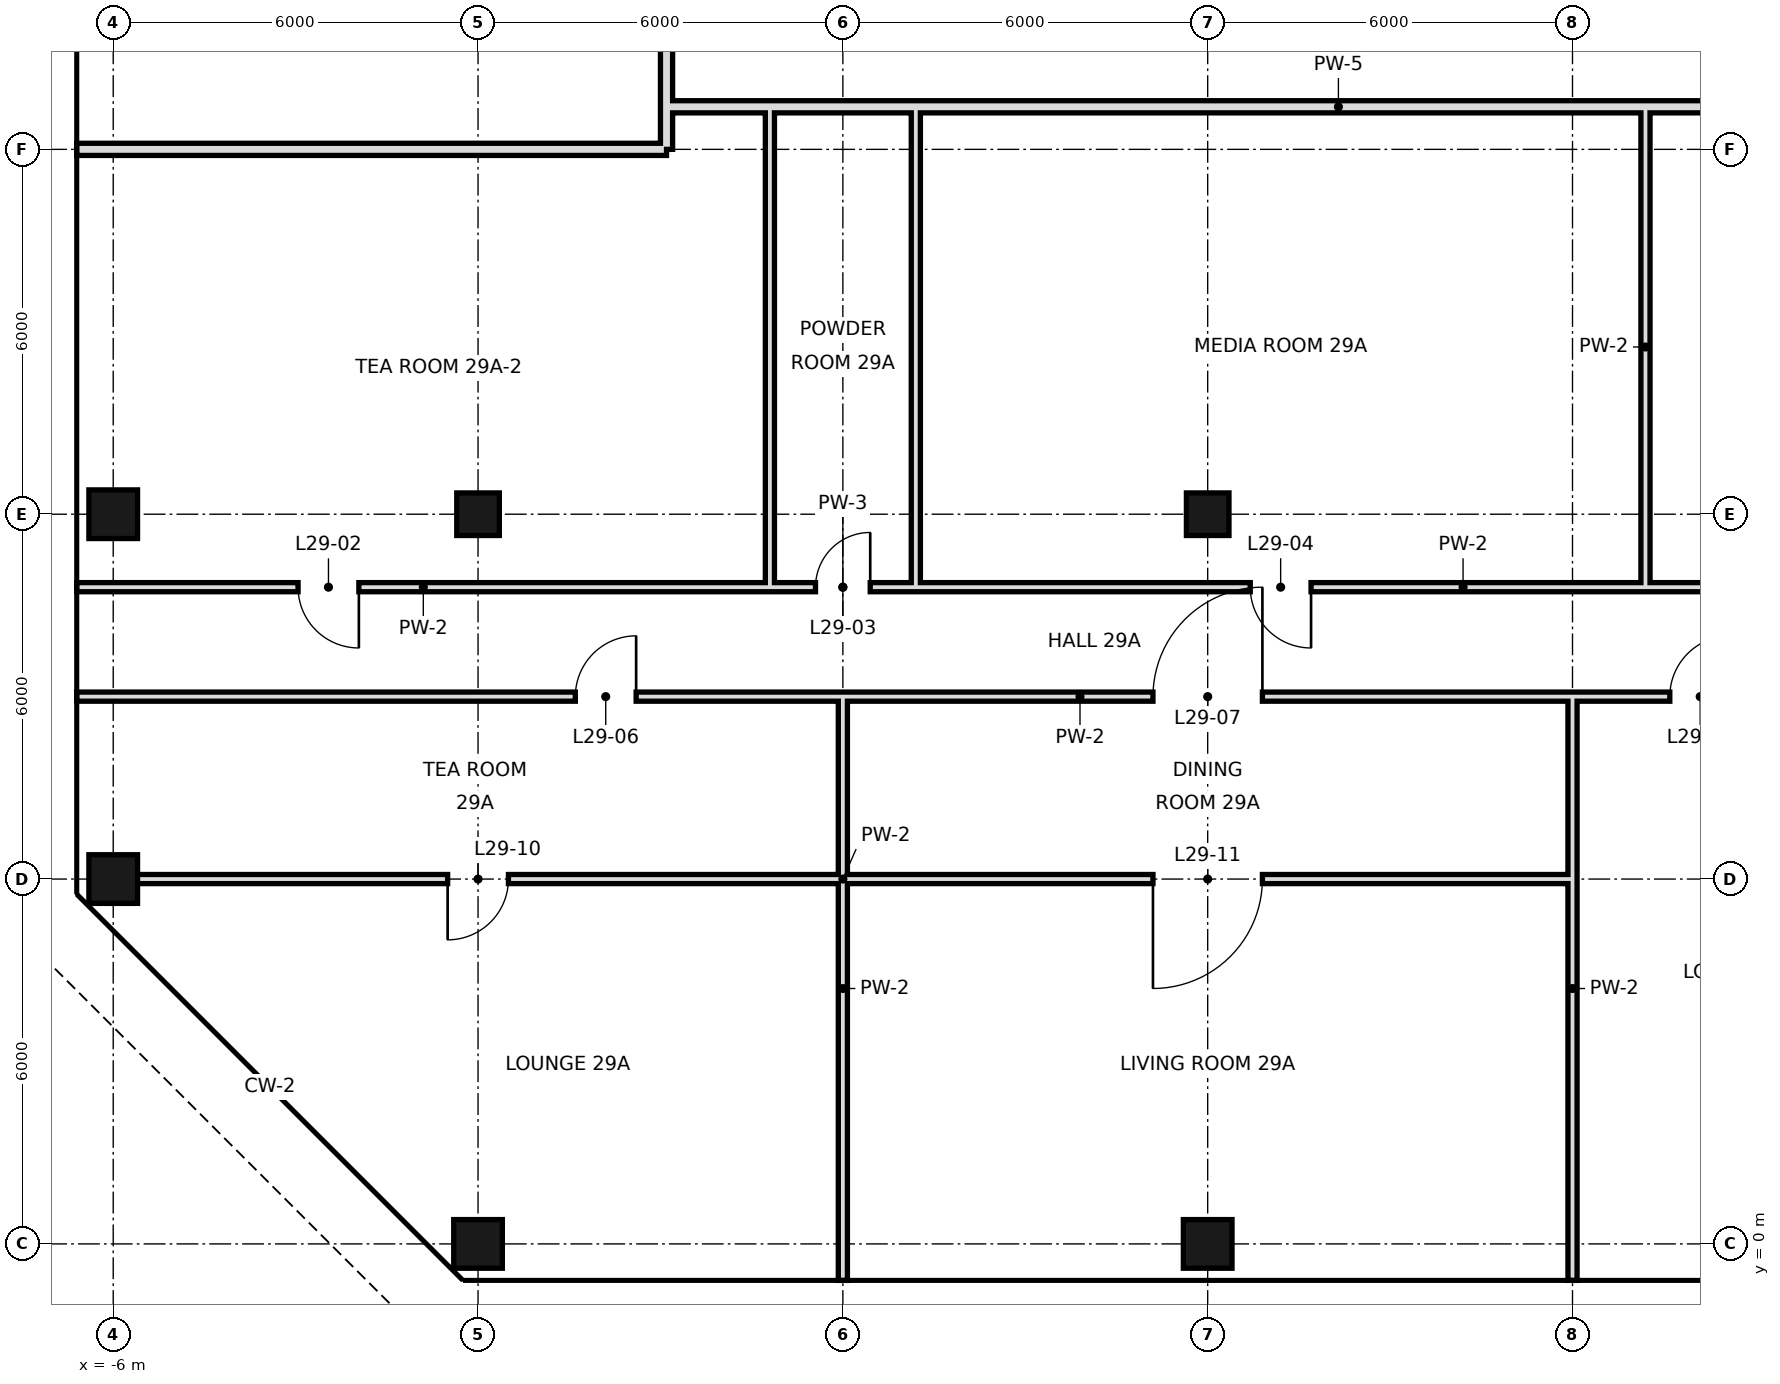
"""IFC4 building model, lengths in metres.
Left out: names, types, materials, properties, quantities, classifications, styles, units other than length and angle.
Written with IfcOpenShell. Run it as: python <this file> out.ifc"""

import sys

from ifc_helpers import new_model, si_unit, direction, frame, frame_2d, origin, origin_2d, place, context, subcontext, project, spatial, rectangle, hollow_rectangle, extrude, element, fill, save


model = new_model("IFC4")
c1 = context("Model", 3, precision=1e-05, world=origin(), true_north=direction((0.0, 1.0)))
c2 = subcontext(c1, "Body", "Model", "MODEL_VIEW")
j1 = project(units=[si_unit("LENGTHUNIT", "METRE"), si_unit("PLANEANGLEUNIT", "RADIAN")], contexts=[c1])
p1 = place(None, origin())
s1 = spatial("IfcSite", under=j1, at=p1, CompositionType="ELEMENT")
p2 = place(p1, origin())
s2 = spatial("IfcBuilding", under=s1, at=p2, CompositionType="ELEMENT")
p3 = place(p2, frame((0.0, 0.0, 130.4)))
s3 = spatial("IfcBuildingStorey", under=s2, at=p3, CompositionType="ELEMENT", Elevation=130.4)
for number, where, z_axis, x_axis in (
    (1, (-6.0, 6.0, 0.0), (0.0, 0.0, 1.0), (1.0, 0.0, 0.0)),
    (2, (-6.0, 12.0, 0.0), (0.0, 0.0, 1.0), (1.0, 0.0, 0.0)),
    (3, (0.0, 0.0, 0.0), (0.0, 0.0, 1.0), (1.0, 0.0, 0.0)),
):
    element("IfcColumn", number, at=place(p3, frame(where, z_axis=z_axis, x_axis=x_axis)), inside=s3, PredefinedType="COLUMN", context=c2, shape_type="SweptSolid", body=[
        extrude(hollow_rectangle(XDim=0.8, YDim=0.8, WallThickness=0.04, at=origin_2d()), origin(), (0.0, 0.0, 1.0), 3.6),
    ])
p4 = place(p3, frame((0.0, 12.0, 0.0), z_axis=(0.0, 0.0, 1.0), x_axis=(1.0, 0.0, 0.0)))
e4 = element("IfcColumn", 4, at=p4, inside=s3, PredefinedType="COLUMN", context=c2, shape_type="SweptSolid", body=[
    extrude(hollow_rectangle(XDim=0.7, YDim=0.7, WallThickness=0.036, at=origin_2d()), origin(), (0.0, 0.0, 1.0), 3.6),
])
p5 = place(p3, frame((12.0, 0.0, 0.0), z_axis=(0.0, 0.0, 1.0), x_axis=(1.0, 0.0, 0.0)))
e5 = element("IfcColumn", 5, at=p5, inside=s3, PredefinedType="COLUMN", context=c2, shape_type="SweptSolid", body=[
    extrude(hollow_rectangle(XDim=0.8, YDim=0.8, WallThickness=0.04, at=origin_2d()), origin(), (0.0, 0.0, 1.0), 3.6),
])
p6 = place(p3, frame((12.0, 12.0, 0.0), z_axis=(0.0, 0.0, 1.0), x_axis=(1.0, 0.0, 0.0)))
e6 = element("IfcColumn", 6, at=p6, inside=s3, PredefinedType="COLUMN", context=c2, shape_type="SweptSolid", body=[
    extrude(hollow_rectangle(XDim=0.7, YDim=0.7, WallThickness=0.036, at=origin_2d()), origin(), (0.0, 0.0, 1.0), 3.6),
])
p7 = place(p3, frame((18.0, -0.6, 0.0), z_axis=(0.0, 0.0, 1.0), x_axis=(0.0, 1.0, 0.0)))
e7 = element("IfcWall", 7, at=p7, inside=s3, PredefinedType="PARTITIONING", context=c2, shape_type="SweptSolid", body=[
    extrude(rectangle(XDim=9.6, YDim=0.15, at=frame_2d((4.8, 0.0))), origin(), (0.0, 0.0, 1.0), 2.72),
])
p8 = place(p3, frame((19.2, 10.8, 0.0), z_axis=(0.0, 0.0, 1.0), x_axis=(0.0, 1.0, 0.0)))
e8 = element("IfcWall", 8, at=p8, inside=s3, PredefinedType="PARTITIONING", context=c2, shape_type="SweptSolid", body=[
    extrude(rectangle(XDim=7.9, YDim=0.15, at=frame_2d((3.95, 0.0))), origin(), (0.0, 0.0, 1.0), 3.42),
])
p9 = place(p3, frame((3.1, 18.0, 0.0), z_axis=(0.0, 0.0, 1.0), x_axis=(0.0, 1.0, 0.0)))
e9 = element("IfcWall", 9, at=p9, inside=s3, PredefinedType="SOLIDWALL", context=c2, shape_type="SweptSolid", body=[
    extrude(rectangle(XDim=30.6, YDim=0.2, at=frame_2d((15.3, 0.0))), origin(), (0.0, 0.0, 1.0), 2.72),
])
p10 = place(p9, frame((9.23, 0.0, 0.0)))
e10 = element("IfcOpeningElement", 10, at=p10, cuts=e9, PredefinedType="OPENING", context=c2, shape_type="SweptSolid", body=[
    extrude(rectangle(XDim=1.2, YDim=2.4, at=frame_2d((0.6, 1.2))), frame((0.0, 0.11, 0.0), z_axis=(0.0, -1.0, 0.0), x_axis=(1.0, 0.0, 0.0)), (0.0, 0.0, 1.0), 0.22),
])
p11 = place(p3, frame((4.8, 10.8, 0.0), z_axis=(0.0, 0.0, 1.0), x_axis=(0.0, 1.0, 0.0)))
e11 = element("IfcWall", 11, at=p11, inside=s3, PredefinedType="PARTITIONING", context=c2, shape_type="SweptSolid", body=[
    extrude(rectangle(XDim=7.9, YDim=0.15, at=frame_2d((3.95, 0.0))), origin(), (0.0, 0.0, 1.0), 3.42),
])
p12 = place(p3, frame((6.0, -0.6, 0.0), z_axis=(0.0, 0.0, 1.0), x_axis=(0.0, 1.0, 0.0)))
e12 = element("IfcWall", 12, at=p12, inside=s3, PredefinedType="PARTITIONING", context=c2, shape_type="SweptSolid", body=[
    extrude(rectangle(XDim=9.6, YDim=0.15, at=frame_2d((4.8, 0.0))), origin(), (0.0, 0.0, 1.0), 2.72),
])
p13 = place(p3, frame((7.2, 10.8, 0.0), z_axis=(0.0, 0.0, 1.0), x_axis=(0.0, 1.0, 0.0)))
e13 = element("IfcWall", 13, at=p13, inside=s3, PredefinedType="PARTITIONING", context=c2, shape_type="SweptSolid", body=[
    extrude(rectangle(XDim=7.9, YDim=0.15, at=frame_2d((3.95, 0.0))), origin(), (0.0, 0.0, 1.0), 3.42),
])
p14 = place(p3, frame((-6.6, 10.8, 0.0), z_axis=(0.0, 0.0, 1.0), x_axis=(1.0, 0.0, 0.0)))
e14 = element("IfcWall", 14, at=p14, inside=s3, PredefinedType="PARTITIONING", context=c2, shape_type="SweptSolid", body=[
    extrude(rectangle(XDim=11.4, YDim=0.15, at=frame_2d((5.7, 0.0))), origin(), (0.0, 0.0, 1.0), 3.42),
])
p15 = place(p14, frame((3.64, 0.0, 0.0)))
e15 = element("IfcOpeningElement", 15, at=p15, cuts=e14, PredefinedType="OPENING", context=c2, shape_type="SweptSolid", body=[
    extrude(rectangle(XDim=1.0, YDim=2.4, at=frame_2d((0.5, 1.2))), frame((0.0, 0.085, 0.0), z_axis=(0.0, -1.0, 0.0), x_axis=(1.0, 0.0, 0.0)), (0.0, 0.0, 1.0), 0.17),
])
p16 = place(p3, frame((7.2, 10.8, 0.0), z_axis=(0.0, 0.0, 1.0), x_axis=(1.0, 0.0, 0.0)))
e16 = element("IfcWall", 16, at=p16, inside=s3, PredefinedType="PARTITIONING", context=c2, shape_type="SweptSolid", body=[
    extrude(rectangle(XDim=18.0, YDim=0.15, at=frame_2d((9.0, 0.0))), origin(), (0.0, 0.0, 1.0), 3.42),
])
p17 = place(p16, frame((14.5, 0.0, 0.0)))
e17 = element("IfcOpeningElement", 17, at=p17, cuts=e16, PredefinedType="OPENING", context=c2, shape_type="SweptSolid", body=[
    extrude(rectangle(XDim=1.0, YDim=2.4, at=frame_2d((0.5, 1.2))), frame((0.0, 0.085, 0.0), z_axis=(0.0, -1.0, 0.0), x_axis=(1.0, 0.0, 0.0)), (0.0, 0.0, 1.0), 0.17),
])
p18 = place(p16, frame((5.5, 0.0, 0.0)))
e18 = element("IfcOpeningElement", 18, at=p18, cuts=e16, PredefinedType="OPENING", context=c2, shape_type="SweptSolid", body=[
    extrude(rectangle(XDim=1.0, YDim=2.4, at=frame_2d((0.5, 1.2))), frame((0.0, 0.085, 0.0), z_axis=(0.0, -1.0, 0.0), x_axis=(1.0, 0.0, 0.0)), (0.0, 0.0, 1.0), 0.17),
])
p19 = place(p3, frame((4.8, 10.8, 0.0), z_axis=(0.0, 0.0, 1.0), x_axis=(1.0, 0.0, 0.0)))
e19 = element("IfcWall", 19, at=p19, inside=s3, PredefinedType="PARTITIONING", context=c2, shape_type="SweptSolid", body=[
    extrude(rectangle(XDim=2.4, YDim=0.15, at=frame_2d((1.2, 0.0))), origin(), (0.0, 0.0, 1.0), 3.42),
])
p20 = place(p19, frame((0.75, 0.0, 0.0)))
e20 = element("IfcOpeningElement", 20, at=p20, cuts=e19, PredefinedType="OPENING", context=c2, shape_type="SweptSolid", body=[
    extrude(rectangle(XDim=0.9, YDim=2.4, at=frame_2d((0.45, 1.2))), frame((0.0, 0.085, 0.0), z_axis=(0.0, -1.0, 0.0), x_axis=(1.0, 0.0, 0.0)), (0.0, 0.0, 1.0), 0.17),
])
p21 = place(p3, frame((-6.6, 18.0, 0.0), z_axis=(0.0, 0.0, 1.0), x_axis=(1.0, 0.0, 0.0)))
e21 = element("IfcWall", 21, at=p21, inside=s3, PredefinedType="SOLIDWALL", context=c2, shape_type="SweptSolid", body=[
    extrude(rectangle(XDim=9.7, YDim=0.2, at=frame_2d((4.85, 0.0))), origin(), (0.0, 0.0, 1.0), 2.72),
])
p22 = place(p3, frame((3.1, 18.7, 0.0), z_axis=(0.0, 0.0, 1.0), x_axis=(1.0, 0.0, 0.0)))
e22 = element("IfcWall", 22, at=p22, inside=s3, PredefinedType="SOLIDWALL", context=c2, shape_type="SweptSolid", body=[
    extrude(rectangle(XDim=22.1, YDim=0.2, at=frame_2d((11.05, 0.0))), origin(), (0.0, 0.0, 1.0), 2.72),
])
p23 = place(p22, frame((19.36, 0.0, 0.0)))
e23 = element("IfcOpeningElement", 23, at=p23, cuts=e22, PredefinedType="OPENING", context=c2, shape_type="SweptSolid", body=[
    extrude(rectangle(XDim=1.2, YDim=2.4, at=frame_2d((0.6, 1.2))), frame((0.0, 0.11, 0.0), z_axis=(0.0, -1.0, 0.0), x_axis=(1.0, 0.0, 0.0)), (0.0, 0.0, 1.0), 0.22),
])
p24 = place(p3, frame((-6.0, 6.0, 0.0), z_axis=(0.0, 0.0, 1.0), x_axis=(1.0, 0.0, 0.0)))
e24 = element("IfcWall", 24, at=p24, inside=s3, PredefinedType="PARTITIONING", context=c2, shape_type="SweptSolid", body=[
    extrude(rectangle(XDim=24.0, YDim=0.15, at=frame_2d((12.0, 0.0))), origin(), (0.0, 0.0, 1.0), 2.97),
])
p25 = place(p24, frame((5.5, 0.0, 0.0)))
e25 = element("IfcOpeningElement", 25, at=p25, cuts=e24, PredefinedType="OPENING", context=c2, shape_type="SweptSolid", body=[
    extrude(rectangle(XDim=1.0, YDim=2.4, at=frame_2d((0.5, 1.2))), frame((0.0, 0.085, 0.0), z_axis=(0.0, -1.0, 0.0), x_axis=(1.0, 0.0, 0.0)), (0.0, 0.0, 1.0), 0.17),
])
p26 = place(p24, frame((17.1, 0.0, 0.0)))
e26 = element("IfcOpeningElement", 26, at=p26, cuts=e24, PredefinedType="OPENING", context=c2, shape_type="SweptSolid", body=[
    extrude(rectangle(XDim=1.8, YDim=2.4, at=frame_2d((0.9, 1.2))), frame((0.0, 0.085, 0.0), z_axis=(0.0, -1.0, 0.0), x_axis=(1.0, 0.0, 0.0)), (0.0, 0.0, 1.0), 0.17),
])
p27 = place(p3, frame((-6.6, 9.0, 0.0), z_axis=(0.0, 0.0, 1.0), x_axis=(1.0, 0.0, 0.0)))
e27 = element("IfcWall", 27, at=p27, inside=s3, PredefinedType="PARTITIONING", context=c2, shape_type="SweptSolid", body=[
    extrude(rectangle(XDim=33.0, YDim=0.15, at=frame_2d((16.5, 0.0))), origin(), (0.0, 0.0, 1.0), 3.42),
])
p28 = place(p27, frame((8.2, 0.0, 0.0)))
e28 = element("IfcOpeningElement", 28, at=p28, cuts=e27, PredefinedType="OPENING", context=c2, shape_type="SweptSolid", body=[
    extrude(rectangle(XDim=1.0, YDim=2.4, at=frame_2d((0.5, 1.2))), frame((0.0, 0.085, 0.0), z_axis=(0.0, -1.0, 0.0), x_axis=(1.0, 0.0, 0.0)), (0.0, 0.0, 1.0), 0.17),
])
p29 = place(p27, frame((17.7, 0.0, 0.0)))
e29 = element("IfcOpeningElement", 29, at=p29, cuts=e27, PredefinedType="OPENING", context=c2, shape_type="SweptSolid", body=[
    extrude(rectangle(XDim=1.8, YDim=2.4, at=frame_2d((0.9, 1.2))), frame((0.0, 0.085, 0.0), z_axis=(0.0, -1.0, 0.0), x_axis=(1.0, 0.0, 0.0)), (0.0, 0.0, 1.0), 0.17),
])
p30 = place(p27, frame((26.2, 0.0, 0.0)))
e30 = element("IfcOpeningElement", 30, at=p30, cuts=e27, PredefinedType="OPENING", context=c2, shape_type="SweptSolid", body=[
    extrude(rectangle(XDim=1.0, YDim=2.4, at=frame_2d((0.5, 1.2))), frame((0.0, 0.085, 0.0), z_axis=(0.0, -1.0, 0.0), x_axis=(1.0, 0.0, 0.0)), (0.0, 0.0, 1.0), 0.17),
])
p31 = place(p27, frame((31.3, 0.0, 0.0)))
e31 = element("IfcOpeningElement", 31, at=p31, cuts=e27, PredefinedType="OPENING", context=c2, shape_type="SweptSolid", body=[
    extrude(rectangle(XDim=1.0, YDim=2.4, at=frame_2d((0.5, 1.2))), frame((0.0, 0.085, 0.0), z_axis=(0.0, -1.0, 0.0), x_axis=(1.0, 0.0, 0.0)), (0.0, 0.0, 1.0), 0.17),
])
p32 = place(p15, origin())
e32 = element("IfcDoor", 32, at=p32, inside=s3, OperationType="SINGLE_SWING_RIGHT", PredefinedType="DOOR", context=c2, shape_type="SweptSolid", body=[
    extrude(rectangle(XDim=1.0, YDim=2.4, at=frame_2d((0.5, 1.2))), frame((0.0, 0.025, 0.0), z_axis=(0.0, -1.0, 0.0), x_axis=(1.0, 0.0, 0.0)), (0.0, 0.0, 1.0), 0.05),
])
fill(e15, e32)
p33 = place(p20, frame((0.9, 0.0, 0.0), z_axis=(0.0, 0.0, 1.0), x_axis=(-1.0, 0.0, 0.0)))
e33 = element("IfcDoor", 33, at=p33, inside=s3, OperationType="SINGLE_SWING_LEFT", PredefinedType="DOOR", context=c2, shape_type="SweptSolid", body=[
    extrude(rectangle(XDim=0.9, YDim=2.4, at=frame_2d((0.45, 1.2))), frame((0.0, 0.025, 0.0), z_axis=(0.0, -1.0, 0.0), x_axis=(1.0, 0.0, 0.0)), (0.0, 0.0, 1.0), 0.05),
])
fill(e20, e33)
p34 = place(p18, origin())
e34 = element("IfcDoor", 34, at=p34, inside=s3, OperationType="SINGLE_SWING_RIGHT", PredefinedType="DOOR", context=c2, shape_type="SweptSolid", body=[
    extrude(rectangle(XDim=1.0, YDim=2.4, at=frame_2d((0.5, 1.2))), frame((0.0, 0.025, 0.0), z_axis=(0.0, -1.0, 0.0), x_axis=(1.0, 0.0, 0.0)), (0.0, 0.0, 1.0), 0.05),
])
fill(e18, e34)
p35 = place(p28, frame((1.0, 0.0, 0.0), z_axis=(0.0, 0.0, 1.0), x_axis=(-1.0, 0.0, 0.0)))
e35 = element("IfcDoor", 35, at=p35, inside=s3, OperationType="SINGLE_SWING_LEFT", PredefinedType="DOOR", context=c2, shape_type="SweptSolid", body=[
    extrude(rectangle(XDim=1.0, YDim=2.4, at=frame_2d((0.5, 1.2))), frame((0.0, 0.025, 0.0), z_axis=(0.0, -1.0, 0.0), x_axis=(1.0, 0.0, 0.0)), (0.0, 0.0, 1.0), 0.05),
])
fill(e28, e35)
p36 = place(p29, frame((1.8, 0.0, 0.0), z_axis=(0.0, 0.0, 1.0), x_axis=(-1.0, 0.0, 0.0)))
e36 = element("IfcDoor", 36, at=p36, inside=s3, OperationType="SINGLE_SWING_LEFT", PredefinedType="DOOR", context=c2, shape_type="SweptSolid", body=[
    extrude(rectangle(XDim=1.8, YDim=2.4, at=frame_2d((0.9, 1.2))), frame((0.0, 0.025, 0.0), z_axis=(0.0, -1.0, 0.0), x_axis=(1.0, 0.0, 0.0)), (0.0, 0.0, 1.0), 0.05),
])
fill(e29, e36)
p37 = place(p30, frame((1.0, 0.0, 0.0), z_axis=(0.0, 0.0, 1.0), x_axis=(-1.0, 0.0, 0.0)))
e37 = element("IfcDoor", 37, at=p37, inside=s3, OperationType="SINGLE_SWING_LEFT", PredefinedType="DOOR", context=c2, shape_type="SweptSolid", body=[
    extrude(rectangle(XDim=1.0, YDim=2.4, at=frame_2d((0.5, 1.2))), frame((0.0, 0.025, 0.0), z_axis=(0.0, -1.0, 0.0), x_axis=(1.0, 0.0, 0.0)), (0.0, 0.0, 1.0), 0.05),
])
fill(e30, e37)
p38 = place(p25, frame((1.0, 0.0, 0.0), z_axis=(0.0, 0.0, 1.0), x_axis=(-1.0, 0.0, 0.0)))
e38 = element("IfcDoor", 38, at=p38, inside=s3, OperationType="SINGLE_SWING_RIGHT", PredefinedType="DOOR", context=c2, shape_type="SweptSolid", body=[
    extrude(rectangle(XDim=1.0, YDim=2.4, at=frame_2d((0.5, 1.2))), frame((0.0, 0.025, 0.0), z_axis=(0.0, -1.0, 0.0), x_axis=(1.0, 0.0, 0.0)), (0.0, 0.0, 1.0), 0.05),
])
fill(e25, e38)
p39 = place(p26, frame((1.8, 0.0, 0.0), z_axis=(0.0, 0.0, 1.0), x_axis=(-1.0, 0.0, 0.0)))
e39 = element("IfcDoor", 39, at=p39, inside=s3, OperationType="SINGLE_SWING_RIGHT", PredefinedType="DOOR", context=c2, shape_type="SweptSolid", body=[
    extrude(rectangle(XDim=1.8, YDim=2.4, at=frame_2d((0.9, 1.2))), frame((0.0, 0.025, 0.0), z_axis=(0.0, -1.0, 0.0), x_axis=(1.0, 0.0, 0.0)), (0.0, 0.0, 1.0), 0.05),
])
fill(e26, e39)
save(model, sys.argv[1])
